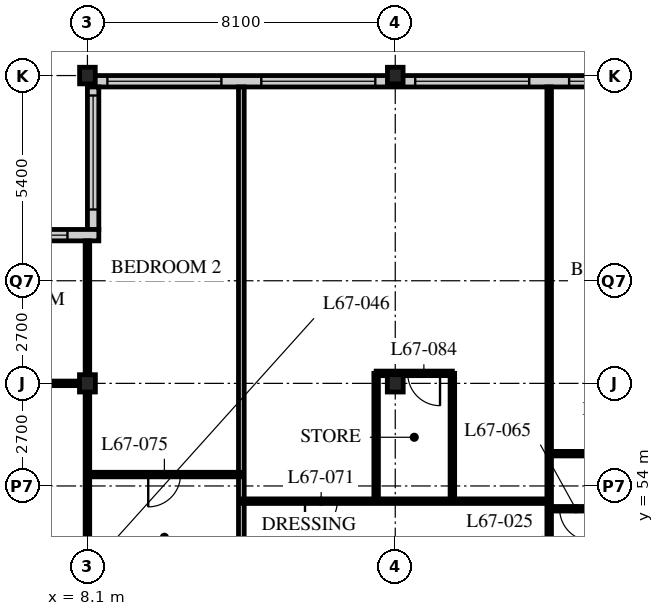
"""IFC4 building model, lengths in metres.
Left out: names, types, materials, properties, quantities, classifications, styles, units other than length and angle.
Written with IfcOpenShell. Run it as: python <this file> out.ifc"""

import sys

from ifc_helpers import new_model, si_unit, direction, frame, frame_2d, origin, origin_2d, place, context, subcontext, project, spatial, rectangle, i_section, extrude, element, fill, save


model = new_model("IFC4")
c1 = context("Model", 3, precision=1e-05, world=origin(), true_north=direction((0.0, 1.0)))
c2 = subcontext(c1, "Body", "Model", "MODEL_VIEW")
j1 = project(units=[si_unit("LENGTHUNIT", "METRE"), si_unit("PLANEANGLEUNIT", "RADIAN")], contexts=[c1])
p1 = place(None, origin())
s1 = spatial("IfcSite", under=j1, at=p1, CompositionType="ELEMENT")
p2 = place(p1, origin())
s2 = spatial("IfcBuilding", under=s1, at=p2, CompositionType="ELEMENT")
p3 = place(p2, frame((0.0, 0.0, 261.9)))
s3 = spatial("IfcBuildingStorey", under=s2, at=p3, CompositionType="ELEMENT", Elevation=261.9)
p4 = place(p3, frame((8.1, 56.7, 0.0), z_axis=(0.0, 0.0, 1.0), x_axis=(1.0, 0.0, 0.0)))
e1 = element("IfcColumn", 1, at=p4, inside=s3, PredefinedType="COLUMN", context=c2, shape_type="SweptSolid", body=[
    extrude(i_section(OverallWidth=0.418, OverallDepth=0.456, WebThickness=0.042, FlangeThickness=0.067, FilletRadius=0.015, at=origin_2d()), origin(), (0.0, 0.0, 1.0), 3.9),
])
p5 = place(p3, frame((8.1, 64.8, 0.0), z_axis=(0.0, 0.0, 1.0), x_axis=(1.0, 0.0, 0.0)))
e2 = element("IfcColumn", 2, at=p5, inside=s3, PredefinedType="COLUMN", context=c2, shape_type="SweptSolid", body=[
    extrude(i_section(OverallWidth=0.412, OverallDepth=0.437, WebThickness=0.036, FlangeThickness=0.058, FilletRadius=0.015, at=origin_2d()), origin(), (0.0, 0.0, 1.0), 3.9),
])
p6 = place(p3, frame((16.2, 56.7, 0.0), z_axis=(0.0, 0.0, 1.0), x_axis=(1.0, 0.0, 0.0)))
e3 = element("IfcColumn", 3, at=p6, inside=s3, PredefinedType="COLUMN", context=c2, shape_type="SweptSolid", body=[
    extrude(i_section(OverallWidth=0.418, OverallDepth=0.456, WebThickness=0.042, FlangeThickness=0.067, FilletRadius=0.015, at=origin_2d()), origin(), (0.0, 0.0, 1.0), 3.9),
])
p7 = place(p3, frame((16.2, 64.8, 0.0), z_axis=(0.0, 0.0, 1.0), x_axis=(1.0, 0.0, 0.0)))
e4 = element("IfcColumn", 4, at=p7, inside=s3, PredefinedType="COLUMN", context=c2, shape_type="SweptSolid", body=[
    extrude(i_section(OverallWidth=0.412, OverallDepth=0.437, WebThickness=0.036, FlangeThickness=0.058, FilletRadius=0.015, at=origin_2d()), origin(), (0.0, 0.0, 1.0), 3.9),
])
p8 = place(p3, frame((48.3, 64.65, 0.0), z_axis=(0.0, 0.0, 1.0), x_axis=(-1.0, 0.0, 0.0)))
e5 = element("IfcWall", 5, at=p8, inside=s3, PredefinedType="SOLIDWALL", context=c2, shape_type="SweptSolid", body=[
    extrude(rectangle(XDim=40.2, YDim=0.3, at=frame_2d((20.1, 0.0))), origin(), (0.0, 0.0, 1.0), 3.69),
])
p9 = place(p8, frame((0.225, 0.0, 0.6)))
e6 = element("IfcOpeningElement", 6, at=p9, cuts=e5, PredefinedType="OPENING", context=c2, shape_type="SweptSolid", body=[
    extrude(rectangle(XDim=3.0, YDim=2.4, at=frame_2d((1.5, 1.2))), frame((0.0, 0.16, 0.0), z_axis=(0.0, -1.0, 0.0), x_axis=(1.0, 0.0, 0.0)), (0.0, 0.0, 1.0), 0.32),
])
p10 = place(p8, frame((4.275, 0.0, 0.6)))
e7 = element("IfcOpeningElement", 7, at=p10, cuts=e5, PredefinedType="OPENING", context=c2, shape_type="SweptSolid", body=[
    extrude(rectangle(XDim=3.0, YDim=2.4, at=frame_2d((1.5, 1.2))), frame((0.0, 0.16, 0.0), z_axis=(0.0, -1.0, 0.0), x_axis=(1.0, 0.0, 0.0)), (0.0, 0.0, 1.0), 0.32),
])
p11 = place(p8, frame((8.325, 0.0, 0.6)))
e8 = element("IfcOpeningElement", 8, at=p11, cuts=e5, PredefinedType="OPENING", context=c2, shape_type="SweptSolid", body=[
    extrude(rectangle(XDim=3.0, YDim=2.4, at=frame_2d((1.5, 1.2))), frame((0.0, 0.16, 0.0), z_axis=(0.0, -1.0, 0.0), x_axis=(1.0, 0.0, 0.0)), (0.0, 0.0, 1.0), 0.32),
])
p12 = place(p8, frame((12.375, 0.0, 0.6)))
e9 = element("IfcOpeningElement", 9, at=p12, cuts=e5, PredefinedType="OPENING", context=c2, shape_type="SweptSolid", body=[
    extrude(rectangle(XDim=3.0, YDim=2.4, at=frame_2d((1.5, 1.2))), frame((0.0, 0.16, 0.0), z_axis=(0.0, -1.0, 0.0), x_axis=(1.0, 0.0, 0.0)), (0.0, 0.0, 1.0), 0.32),
])
p13 = place(p8, frame((16.425, 0.0, 0.6)))
e10 = element("IfcOpeningElement", 10, at=p13, cuts=e5, PredefinedType="OPENING", context=c2, shape_type="SweptSolid", body=[
    extrude(rectangle(XDim=3.0, YDim=2.4, at=frame_2d((1.5, 1.2))), frame((0.0, 0.16, 0.0), z_axis=(0.0, -1.0, 0.0), x_axis=(1.0, 0.0, 0.0)), (0.0, 0.0, 1.0), 0.32),
])
p14 = place(p8, frame((20.475, 0.0, 0.6)))
e11 = element("IfcOpeningElement", 11, at=p14, cuts=e5, PredefinedType="OPENING", context=c2, shape_type="SweptSolid", body=[
    extrude(rectangle(XDim=3.0, YDim=2.4, at=frame_2d((1.5, 1.2))), frame((0.0, 0.16, 0.0), z_axis=(0.0, -1.0, 0.0), x_axis=(1.0, 0.0, 0.0)), (0.0, 0.0, 1.0), 0.32),
])
p15 = place(p8, frame((24.525, 0.0, 0.6)))
e12 = element("IfcOpeningElement", 12, at=p15, cuts=e5, PredefinedType="OPENING", context=c2, shape_type="SweptSolid", body=[
    extrude(rectangle(XDim=3.0, YDim=2.4, at=frame_2d((1.5, 1.2))), frame((0.0, 0.16, 0.0), z_axis=(0.0, -1.0, 0.0), x_axis=(1.0, 0.0, 0.0)), (0.0, 0.0, 1.0), 0.32),
])
p16 = place(p8, frame((28.575, 0.0, 0.6)))
e13 = element("IfcOpeningElement", 13, at=p16, cuts=e5, PredefinedType="OPENING", context=c2, shape_type="SweptSolid", body=[
    extrude(rectangle(XDim=3.0, YDim=2.4, at=frame_2d((1.5, 1.2))), frame((0.0, 0.16, 0.0), z_axis=(0.0, -1.0, 0.0), x_axis=(1.0, 0.0, 0.0)), (0.0, 0.0, 1.0), 0.32),
])
p17 = place(p8, frame((32.625, 0.0, 0.6)))
e14 = element("IfcOpeningElement", 14, at=p17, cuts=e5, PredefinedType="OPENING", context=c2, shape_type="SweptSolid", body=[
    extrude(rectangle(XDim=3.0, YDim=2.4, at=frame_2d((1.5, 1.2))), frame((0.0, 0.16, 0.0), z_axis=(0.0, -1.0, 0.0), x_axis=(1.0, 0.0, 0.0)), (0.0, 0.0, 1.0), 0.32),
])
p18 = place(p8, frame((36.675, 0.0, 0.6)))
e15 = element("IfcOpeningElement", 15, at=p18, cuts=e5, PredefinedType="OPENING", context=c2, shape_type="SweptSolid", body=[
    extrude(rectangle(XDim=3.0, YDim=2.4, at=frame_2d((1.5, 1.2))), frame((0.0, 0.16, 0.0), z_axis=(0.0, -1.0, 0.0), x_axis=(1.0, 0.0, 0.0)), (0.0, 0.0, 1.0), 0.32),
])
p19 = place(p3, frame((8.25, 64.5, 0.0), z_axis=(0.0, 0.0, 1.0), x_axis=(0.0, -1.0, 0.0)))
e16 = element("IfcWall", 16, at=p19, inside=s3, PredefinedType="SOLIDWALL", context=c2, shape_type="SweptSolid", body=[
    extrude(rectangle(XDim=3.75, YDim=0.3, at=frame_2d((1.875, 0.0))), origin(), (0.0, 0.0, 1.0), 3.69),
])
p20 = place(p19, frame((0.225, 0.0, 0.6)))
e17 = element("IfcOpeningElement", 17, at=p20, cuts=e16, PredefinedType="OPENING", context=c2, shape_type="SweptSolid", body=[
    extrude(rectangle(XDim=3.0, YDim=2.3, at=frame_2d((1.5, 1.15))), frame((0.0, 0.16, 0.0), z_axis=(0.0, -1.0, 0.0), x_axis=(1.0, 0.0, 0.0)), (0.0, 0.0, 1.0), 0.32),
])
p21 = place(p3, frame((8.4, 60.6, 0.0), z_axis=(0.0, 0.0, 1.0), x_axis=(-1.0, 0.0, 0.0)))
e18 = element("IfcWall", 18, at=p21, inside=s3, PredefinedType="SOLIDWALL", context=c2, shape_type="SweptSolid", body=[
    extrude(rectangle(XDim=4.35, YDim=0.3, at=frame_2d((2.175, 0.0))), origin(), (0.0, 0.0, 1.0), 3.69),
])
p22 = place(p21, frame((0.825, 0.0, 0.6)))
e19 = element("IfcOpeningElement", 19, at=p22, cuts=e18, PredefinedType="OPENING", context=c2, shape_type="SweptSolid", body=[
    extrude(rectangle(XDim=3.0, YDim=2.3, at=frame_2d((1.5, 1.15))), frame((0.0, 0.16, 0.0), z_axis=(0.0, -1.0, 0.0), x_axis=(1.0, 0.0, 0.0)), (0.0, 0.0, 1.0), 0.32),
])
p23 = place(p3, frame((20.25, 51.0, 0.0), z_axis=(0.0, 0.0, 1.0), x_axis=(0.0, 1.0, 0.0)))
e20 = element("IfcWall", 20, at=p23, inside=s3, PredefinedType="PARTITIONING", context=c2, shape_type="SweptSolid", body=[
    extrude(rectangle(XDim=13.5, YDim=0.12, at=frame_2d((6.75, 0.0))), origin(), (0.0, 0.0, 1.0), 3.69),
])
p24 = place(p3, frame((8.1, 51.0, 0.0), z_axis=(0.0, 0.0, 1.0), x_axis=(0.0, 1.0, 0.0)))
e21 = element("IfcWall", 21, at=p24, inside=s3, PredefinedType="PARTITIONING", context=c2, shape_type="SweptSolid", body=[
    extrude(rectangle(XDim=9.45, YDim=0.12, at=frame_2d((4.725, 0.0))), origin(), (0.0, 0.0, 1.0), 3.078),
])
p25 = place(p3, frame((8.1, 56.7, 0.0), z_axis=(0.0, 0.0, 1.0), x_axis=(-1.0, 0.0, 0.0)))
e22 = element("IfcWall", 22, at=p25, inside=s3, PredefinedType="PARTITIONING", context=c2, shape_type="SweptSolid", body=[
    extrude(rectangle(XDim=3.75, YDim=0.12, at=frame_2d((1.875, 0.0))), origin(), (0.0, 0.0, 1.0), 3.078),
])
p26 = place(p25, frame((1.875, 0.0, 0.0)))
e23 = element("IfcOpeningElement", 23, at=p26, cuts=e22, PredefinedType="OPENING", context=c2, shape_type="SweptSolid", body=[
    extrude(rectangle(XDim=0.85, YDim=2.1, at=frame_2d((0.425, 1.05))), frame((0.0, 0.07, 0.0), z_axis=(0.0, -1.0, 0.0), x_axis=(1.0, 0.0, 0.0)), (0.0, 0.0, 1.0), 0.14),
])
p27 = place(p3, frame((12.15, 48.6, 0.0), z_axis=(0.0, 0.0, 1.0), x_axis=(0.0, 1.0, 0.0)))
e24 = element("IfcWall", 24, at=p27, inside=s3, PredefinedType="PARTITIONING", context=c2, shape_type="SweptSolid", body=[
    extrude(rectangle(XDim=15.9, YDim=0.15, at=frame_2d((7.95, 0.0))), origin(), (0.0, 0.0, 1.0), 3.69),
])
p28 = place(p3, frame((20.25, 53.4, 0.0), z_axis=(0.0, 0.0, 1.0), x_axis=(1.0, 0.0, 0.0)))
e25 = element("IfcWall", 25, at=p28, inside=s3, PredefinedType="PARTITIONING", context=c2, shape_type="SweptSolid", body=[
    extrude(rectangle(XDim=1.76, YDim=0.12, at=frame_2d((0.88, 0.0))), origin(), (0.0, 0.0, 1.0), 3.69),
])
p29 = place(p28, frame((0.275, 0.0, 0.0)))
e26 = element("IfcOpeningElement", 26, at=p29, cuts=e25, PredefinedType="OPENING", context=c2, shape_type="SweptSolid", body=[
    extrude(rectangle(XDim=0.85, YDim=2.1, at=frame_2d((0.425, 1.05))), frame((0.0, 0.07, 0.0), z_axis=(0.0, -1.0, 0.0), x_axis=(1.0, 0.0, 0.0)), (0.0, 0.0, 1.0), 0.14),
])
p30 = place(p3, frame((12.15, 53.6, 0.0), z_axis=(0.0, 0.0, 1.0), x_axis=(1.0, 0.0, 0.0)))
e27 = element("IfcWall", 27, at=p30, inside=s3, PredefinedType="PARTITIONING", context=c2, shape_type="SweptSolid", body=[
    extrude(rectangle(XDim=8.1, YDim=0.12, at=frame_2d((4.05, 0.0))), origin(), (0.0, 0.0, 1.0), 3.69),
])
p31 = place(p30, frame((1.675, 0.0, 0.0)))
e28 = element("IfcOpeningElement", 28, at=p31, cuts=e27, PredefinedType="OPENING", context=c2, shape_type="SweptSolid", body=[
    extrude(rectangle(XDim=0.85, YDim=2.1, at=frame_2d((0.425, 1.05))), frame((0.0, 0.07, 0.0), z_axis=(0.0, -1.0, 0.0), x_axis=(1.0, 0.0, 0.0)), (0.0, 0.0, 1.0), 0.14),
])
p32 = place(p3, frame((20.25, 54.85, 0.0), z_axis=(0.0, 0.0, 1.0), x_axis=(1.0, 0.0, 0.0)))
e29 = element("IfcWall", 29, at=p32, inside=s3, PredefinedType="PARTITIONING", context=c2, shape_type="SweptSolid", body=[
    extrude(rectangle(XDim=4.05, YDim=0.12, at=frame_2d((2.025, 0.0))), origin(), (0.0, 0.0, 1.0), 3.69),
])
p33 = place(p32, frame((1.6, 0.0, 0.0)))
e30 = element("IfcOpeningElement", 30, at=p33, cuts=e29, PredefinedType="OPENING", context=c2, shape_type="SweptSolid", body=[
    extrude(rectangle(XDim=0.85, YDim=2.1, at=frame_2d((0.425, 1.05))), frame((0.0, 0.07, 0.0), z_axis=(0.0, -1.0, 0.0), x_axis=(1.0, 0.0, 0.0)), (0.0, 0.0, 1.0), 0.14),
])
p34 = place(p3, frame((8.1, 54.3, 0.0), z_axis=(0.0, 0.0, 1.0), x_axis=(1.0, 0.0, 0.0)))
e31 = element("IfcWall", 31, at=p34, inside=s3, PredefinedType="PARTITIONING", context=c2, shape_type="SweptSolid", body=[
    extrude(rectangle(XDim=4.05, YDim=0.12, at=frame_2d((2.025, 0.0))), origin(), (0.0, 0.0, 1.0), 3.69),
])
p35 = place(p34, frame((1.6, 0.0, 0.0)))
e32 = element("IfcOpeningElement", 32, at=p35, cuts=e31, PredefinedType="OPENING", context=c2, shape_type="SweptSolid", body=[
    extrude(rectangle(XDim=0.85, YDim=2.1, at=frame_2d((0.425, 1.05))), frame((0.0, 0.07, 0.0), z_axis=(0.0, -1.0, 0.0), x_axis=(1.0, 0.0, 0.0)), (0.0, 0.0, 1.0), 0.14),
])
for number, where, z_axis, x_axis in (
    (33, (15.697, 53.6, 0.0), (0.0, 0.0, 1.0), (0.0, 1.0, 0.0)),
    (34, (17.703, 53.6, 0.0), (0.0, 0.0, 1.0), (0.0, 1.0, 0.0)),
):
    element("IfcWall", number, at=place(p3, frame(where, z_axis=z_axis, x_axis=x_axis)), inside=s3, PredefinedType="PARTITIONING", context=c2, shape_type="SweptSolid", body=[
        extrude(rectangle(XDim=3.363, YDim=0.12, at=frame_2d((1.681, 0.0))), origin(), (0.0, 0.0, 1.0), 3.69),
    ])
p36 = place(p3, frame((15.697, 56.963, 0.0), z_axis=(0.0, 0.0, 1.0), x_axis=(1.0, 0.0, 0.0)))
e35 = element("IfcWall", 35, at=p36, inside=s3, PredefinedType="PARTITIONING", context=c2, shape_type="SweptSolid", body=[
    extrude(rectangle(XDim=2.006, YDim=0.12, at=frame_2d((1.003, 0.0))), origin(), (0.0, 0.0, 1.0), 3.69),
])
p37 = place(p36, frame((0.831, 0.0, 0.0)))
e36 = element("IfcOpeningElement", 36, at=p37, cuts=e35, PredefinedType="OPENING", context=c2, shape_type="SweptSolid", body=[
    extrude(rectangle(XDim=0.85, YDim=2.1, at=frame_2d((0.425, 1.05))), frame((0.0, 0.07, 0.0), z_axis=(0.0, -1.0, 0.0), x_axis=(1.0, 0.0, 0.0)), (0.0, 0.0, 1.0), 0.14),
])
p38 = place(p15, origin())
e37 = element("IfcWindow", 37, at=p38, inside=s3, PartitioningType="SINGLE_PANEL", PredefinedType="WINDOW", context=c2, shape_type="SweptSolid", body=[
    extrude(rectangle(XDim=3.0, YDim=2.4, at=frame_2d((1.5, 1.2))), frame((0.0, 0.03, 0.0), z_axis=(0.0, -1.0, 0.0), x_axis=(1.0, 0.0, 0.0)), (0.0, 0.0, 1.0), 0.06),
])
fill(e12, e37)
p39 = place(p16, origin())
e38 = element("IfcWindow", 38, at=p39, inside=s3, PartitioningType="SINGLE_PANEL", PredefinedType="WINDOW", context=c2, shape_type="SweptSolid", body=[
    extrude(rectangle(XDim=3.0, YDim=2.4, at=frame_2d((1.5, 1.2))), frame((0.0, 0.03, 0.0), z_axis=(0.0, -1.0, 0.0), x_axis=(1.0, 0.0, 0.0)), (0.0, 0.0, 1.0), 0.06),
])
fill(e13, e38)
p40 = place(p17, origin())
e39 = element("IfcWindow", 39, at=p40, inside=s3, PartitioningType="SINGLE_PANEL", PredefinedType="WINDOW", context=c2, shape_type="SweptSolid", body=[
    extrude(rectangle(XDim=3.0, YDim=2.4, at=frame_2d((1.5, 1.2))), frame((0.0, 0.03, 0.0), z_axis=(0.0, -1.0, 0.0), x_axis=(1.0, 0.0, 0.0)), (0.0, 0.0, 1.0), 0.06),
])
fill(e14, e39)
p41 = place(p18, origin())
e40 = element("IfcWindow", 40, at=p41, inside=s3, PartitioningType="SINGLE_PANEL", PredefinedType="WINDOW", context=c2, shape_type="SweptSolid", body=[
    extrude(rectangle(XDim=3.0, YDim=2.4, at=frame_2d((1.5, 1.2))), frame((0.0, 0.03, 0.0), z_axis=(0.0, -1.0, 0.0), x_axis=(1.0, 0.0, 0.0)), (0.0, 0.0, 1.0), 0.06),
])
fill(e15, e40)
p42 = place(p20, origin())
e41 = element("IfcWindow", 41, at=p42, inside=s3, PartitioningType="SINGLE_PANEL", PredefinedType="WINDOW", context=c2, shape_type="SweptSolid", body=[
    extrude(rectangle(XDim=3.0, YDim=2.3, at=frame_2d((1.5, 1.15))), frame((0.0, 0.03, 0.0), z_axis=(0.0, -1.0, 0.0), x_axis=(1.0, 0.0, 0.0)), (0.0, 0.0, 1.0), 0.06),
])
fill(e17, e41)
p43 = place(p22, origin())
e42 = element("IfcWindow", 42, at=p43, inside=s3, PartitioningType="SINGLE_PANEL", PredefinedType="WINDOW", context=c2, shape_type="SweptSolid", body=[
    extrude(rectangle(XDim=3.0, YDim=2.3, at=frame_2d((1.5, 1.15))), frame((0.0, 0.03, 0.0), z_axis=(0.0, -1.0, 0.0), x_axis=(1.0, 0.0, 0.0)), (0.0, 0.0, 1.0), 0.06),
])
fill(e19, e42)
p44 = place(p29, origin())
e43 = element("IfcDoor", 43, at=p44, inside=s3, OperationType="SINGLE_SWING_LEFT", PredefinedType="DOOR", context=c2, shape_type="SweptSolid", body=[
    extrude(rectangle(XDim=0.85, YDim=2.1, at=frame_2d((0.425, 1.05))), frame((0.0, 0.025, 0.0), z_axis=(0.0, -1.0, 0.0), x_axis=(1.0, 0.0, 0.0)), (0.0, 0.0, 1.0), 0.05),
])
fill(e26, e43)
p45 = place(p31, origin())
e44 = element("IfcDoor", 44, at=p45, inside=s3, OperationType="SINGLE_SWING_RIGHT", PredefinedType="DOOR", context=c2, shape_type="SweptSolid", body=[
    extrude(rectangle(XDim=0.85, YDim=2.1, at=frame_2d((0.425, 1.05))), frame((0.0, 0.025, 0.0), z_axis=(0.0, -1.0, 0.0), x_axis=(1.0, 0.0, 0.0)), (0.0, 0.0, 1.0), 0.05),
])
fill(e28, e44)
p46 = place(p35, origin())
e45 = element("IfcDoor", 45, at=p46, inside=s3, OperationType="SINGLE_SWING_RIGHT", PredefinedType="DOOR", context=c2, shape_type="SweptSolid", body=[
    extrude(rectangle(XDim=0.85, YDim=2.1, at=frame_2d((0.425, 1.05))), frame((0.0, 0.025, 0.0), z_axis=(0.0, -1.0, 0.0), x_axis=(1.0, 0.0, 0.0)), (0.0, 0.0, 1.0), 0.05),
])
fill(e32, e45)
p47 = place(p37, origin())
e46 = element("IfcDoor", 46, at=p47, inside=s3, OperationType="SINGLE_SWING_LEFT", PredefinedType="DOOR", context=c2, shape_type="SweptSolid", body=[
    extrude(rectangle(XDim=0.85, YDim=2.1, at=frame_2d((0.425, 1.05))), frame((0.0, 0.025, 0.0), z_axis=(0.0, -1.0, 0.0), x_axis=(1.0, 0.0, 0.0)), (0.0, 0.0, 1.0), 0.05),
])
fill(e36, e46)
save(model, sys.argv[1])
